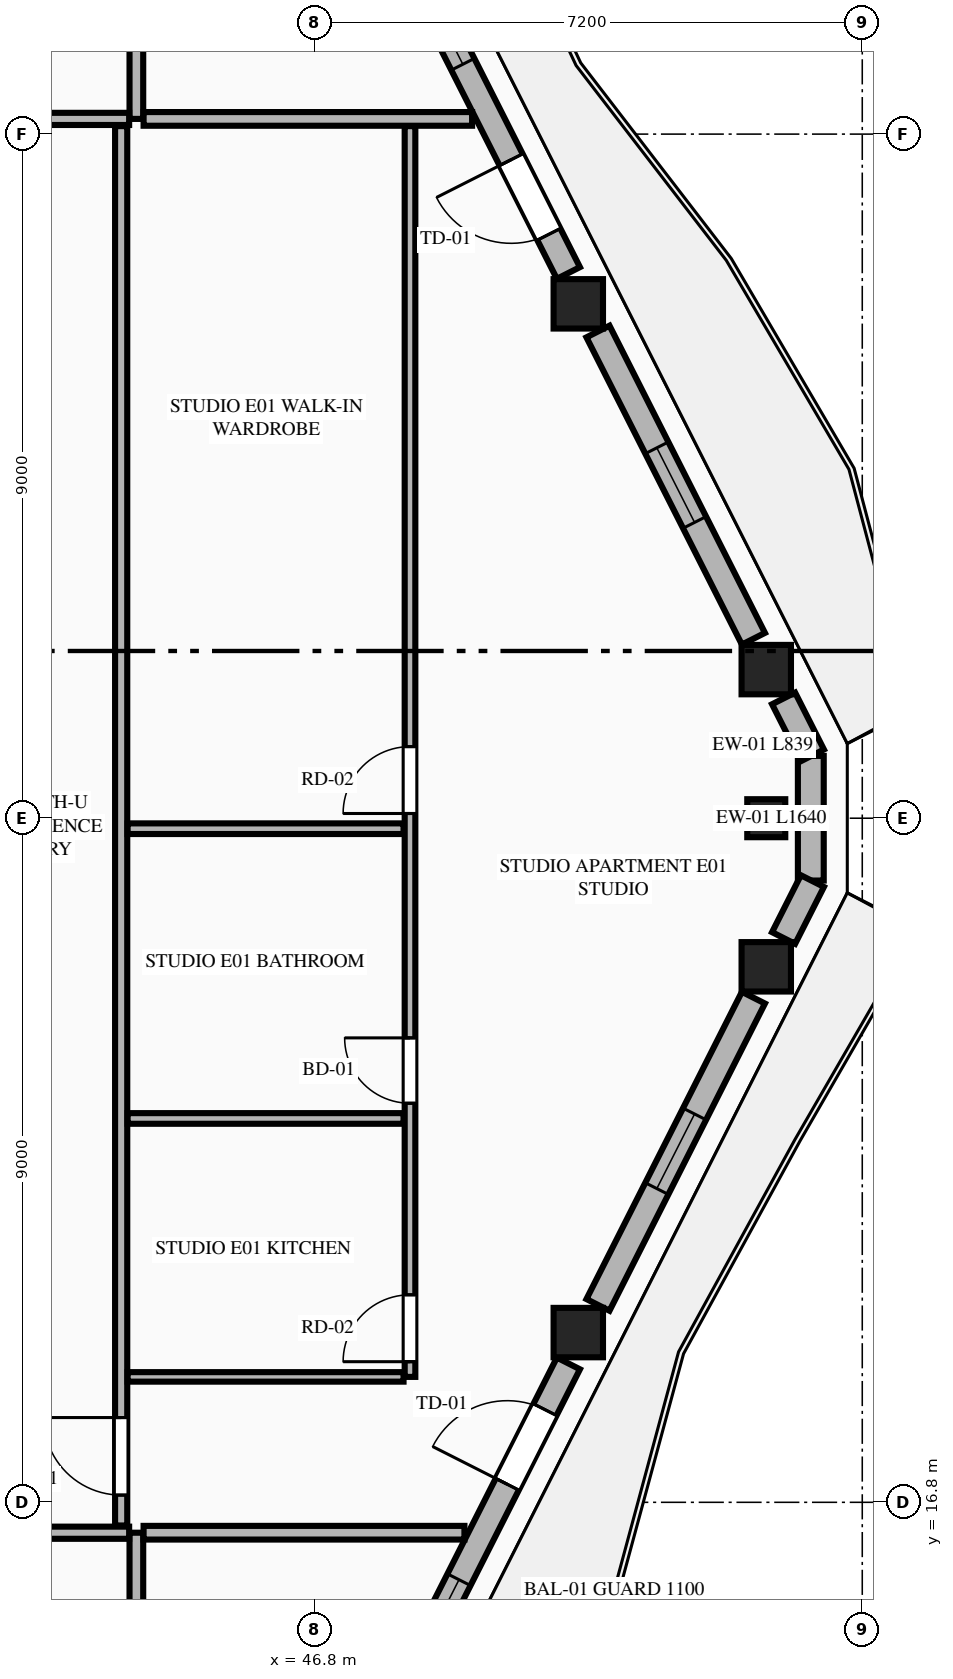
"""IFC4 building model, lengths in metres.
Left out: names, types, materials, properties, quantities, classifications, styles, units other than length and angle.
Written with IfcOpenShell. Run it as: python <this file> out.ifc"""

import sys

from ifc_helpers import new_model, si_unit, direction, frame, frame_2d, origin, origin_2d, place, context, subcontext, project, spatial, rectangle, extrude, element, fill, save


model = new_model("IFC4")
c1 = context("Model", 3, precision=1e-05, world=origin(), true_north=direction((0.0, 1.0)))
c2 = subcontext(c1, "Body", "Model", "MODEL_VIEW")
j1 = project(units=[si_unit("LENGTHUNIT", "METRE"), si_unit("PLANEANGLEUNIT", "RADIAN")], contexts=[c1])
p1 = place(None, origin())
s1 = spatial("IfcSite", under=j1, at=p1, CompositionType="ELEMENT")
p2 = place(p1, origin())
s2 = spatial("IfcBuilding", under=s1, at=p2, CompositionType="ELEMENT")
p3 = place(p2, frame((0.0, 0.0, 283.5)))
s3 = spatial("IfcBuildingStorey", under=s2, at=p3, CompositionType="ELEMENT", Elevation=283.5)
for number, where, z_axis, x_axis in (
    (1, (50.264, 19.033, 0.0), (0.0, 0.0, 1.0), (1.0, 0.0, 0.0)),
    (2, (52.737, 23.845, 0.0), (0.0, 0.0, 1.0), (1.0, 0.0, 0.0)),
    (3, (52.737, 27.755, 0.0), (0.0, 0.0, 1.0), (1.0, 0.0, 0.0)),
    (4, (50.264, 32.567, 0.0), (0.0, 0.0, 1.0), (1.0, 0.0, 0.0)),
):
    element("IfcColumn", number, at=place(p3, frame(where, z_axis=z_axis, x_axis=x_axis)), inside=s3, PredefinedType="COLUMN", context=c2, shape_type="SweptSolid", body=[
        extrude(rectangle(XDim=0.65, YDim=0.65, at=origin_2d()), origin(), (0.0, 0.0, 1.0), 4.0),
    ])
p4 = place(p3, frame((52.737, 25.8, 0.0), z_axis=(0.0, 0.0, 1.0), x_axis=(0.0, 1.0, 0.0)))
e5 = element("IfcColumn", 5, at=p4, inside=s3, PredefinedType="PILASTER", context=c2, shape_type="SweptSolid", body=[
    extrude(rectangle(XDim=0.5, YDim=0.35, at=origin_2d()), origin(), (0.0, 0.0, 1.0), 4.0),
])
p5 = place(p3, frame((53.323, 24.98, 0.0), z_axis=(0.0, 0.0, 1.0), x_axis=(0.0, 1.0, 0.0)))
e6 = element("IfcWall", 6, at=p5, inside=s3, PredefinedType="STANDARD", context=c2, shape_type="SweptSolid", body=[
    extrude(rectangle(XDim=1.64, YDim=0.34, at=frame_2d((0.82, 0.0))), origin(), (0.0, 0.0, 1.0), 3.8),
])
p6 = place(p3, frame((48.002, 14.413, 0.0), z_axis=(0.0, 0.0, 1.0), x_axis=(0.451468341582, 0.892287137949, 0.0)))
e7 = element("IfcWall", 7, at=p6, inside=s3, PredefinedType="STANDARD", context=c2, shape_type="SweptSolid", body=[
    extrude(rectangle(XDim=4.723, YDim=0.34, at=frame_2d((2.361, 0.0))), origin(), (0.0, 0.0, 1.0), 2.99),
])
p7 = place(p6, frame((2.941, 0.0, 0.0)))
e8 = element("IfcOpeningElement", 8, at=p7, cuts=e7, PredefinedType="OPENING", context=c2, shape_type="SweptSolid", body=[
    extrude(rectangle(XDim=1.1, YDim=2.25, at=frame_2d((0.55, 1.125))), frame((0.0, 0.18, 0.0), z_axis=(0.0, -1.0, 0.0), x_axis=(1.0, 0.0, 0.0)), (0.0, 0.0, 1.0), 0.36),
])
p8 = place(p6, frame((0.434, 0.0, 0.75)))
e9 = element("IfcOpeningElement", 9, at=p8, cuts=e7, PredefinedType="OPENING", context=c2, shape_type="SweptSolid", body=[
    extrude(rectangle(XDim=1.1, YDim=2.0, at=frame_2d((0.55, 1.0))), frame((0.0, 0.18, 0.0), z_axis=(0.0, -1.0, 0.0), x_axis=(1.0, 0.0, 0.0)), (0.0, 0.0, 1.0), 0.36),
])
p9 = place(p3, frame((50.523, 19.397, 0.0), z_axis=(0.0, 0.0, 1.0), x_axis=(0.45147697324, 0.892282770558, 0.0)))
e10 = element("IfcWall", 10, at=p9, inside=s3, PredefinedType="STANDARD", context=c2, shape_type="SweptSolid", body=[
    extrude(rectangle(XDim=4.53, YDim=0.34, at=frame_2d((2.265, 0.0))), origin(), (0.0, 0.0, 1.0), 2.99),
])
p10 = place(p9, frame((1.715, 0.0, 0.75)))
e11 = element("IfcOpeningElement", 11, at=p10, cuts=e10, PredefinedType="OPENING", context=c2, shape_type="SweptSolid", body=[
    extrude(rectangle(XDim=1.1, YDim=2.0, at=frame_2d((0.55, 1.0))), frame((0.0, 0.18, 0.0), z_axis=(0.0, -1.0, 0.0), x_axis=(1.0, 0.0, 0.0)), (0.0, 0.0, 1.0), 0.36),
])
p11 = place(p3, frame((52.965, 24.224, 0.0), z_axis=(0.0, 0.0, 1.0), x_axis=(0.4515140893, 0.892263989615, 0.0)))
e12 = element("IfcWall", 12, at=p11, inside=s3, PredefinedType="STANDARD", context=c2, shape_type="SweptSolid", body=[
    extrude(rectangle(XDim=0.839, YDim=0.34, at=frame_2d((0.419, 0.0))), origin(), (0.0, 0.0, 1.0), 3.8),
])
p12 = place(p3, frame((53.344, 26.627, 0.0), z_axis=(0.0, 0.0, 1.0), x_axis=(-0.45139691133, 0.892323275748, 0.0)))
e13 = element("IfcWall", 13, at=p12, inside=s3, PredefinedType="STANDARD", context=c2, shape_type="SweptSolid", body=[
    extrude(rectangle(XDim=0.839, YDim=0.34, at=frame_2d((0.42, 0.0))), origin(), (0.0, 0.0, 1.0), 3.8),
])
p13 = place(p3, frame((52.568, 28.161, 0.0), z_axis=(0.0, 0.0, 1.0), x_axis=(-0.45147697324, 0.892282770558, 0.0)))
e14 = element("IfcWall", 14, at=p13, inside=s3, PredefinedType="STANDARD", context=c2, shape_type="SweptSolid", body=[
    extrude(rectangle(XDim=4.53, YDim=0.34, at=frame_2d((2.265, 0.0))), origin(), (0.0, 0.0, 1.0), 2.99),
])
p14 = place(p13, frame((1.715, 0.0, 0.75)))
e15 = element("IfcOpeningElement", 15, at=p14, cuts=e14, PredefinedType="OPENING", context=c2, shape_type="SweptSolid", body=[
    extrude(rectangle(XDim=1.1, YDim=2.0, at=frame_2d((0.55, 1.0))), frame((0.0, 0.18, 0.0), z_axis=(0.0, -1.0, 0.0), x_axis=(1.0, 0.0, 0.0)), (0.0, 0.0, 1.0), 0.36),
])
p15 = place(p3, frame((50.134, 32.973, 0.0), z_axis=(0.0, 0.0, 1.0), x_axis=(-0.451447516904, 0.892297674255, 0.0)))
e16 = element("IfcWall", 16, at=p15, inside=s3, PredefinedType="STANDARD", context=c2, shape_type="SweptSolid", body=[
    extrude(rectangle(XDim=4.723, YDim=0.34, at=frame_2d((2.361, 0.0))), origin(), (0.0, 0.0, 1.0), 2.99),
])
p16 = place(p15, frame((0.57, 0.0, 0.0)))
e17 = element("IfcOpeningElement", 17, at=p16, cuts=e16, PredefinedType="OPENING", context=c2, shape_type="SweptSolid", body=[
    extrude(rectangle(XDim=1.1, YDim=2.25, at=frame_2d((0.55, 1.125))), frame((0.0, 0.18, 0.0), z_axis=(0.0, -1.0, 0.0), x_axis=(1.0, 0.0, 0.0)), (0.0, 0.0, 1.0), 0.36),
])
p17 = place(p15, frame((3.077, 0.0, 0.75)))
e18 = element("IfcOpeningElement", 18, at=p17, cuts=e16, PredefinedType="OPENING", context=c2, shape_type="SweptSolid", body=[
    extrude(rectangle(XDim=1.1, YDim=2.0, at=frame_2d((0.55, 1.0))), frame((0.0, 0.18, 0.0), z_axis=(0.0, -1.0, 0.0), x_axis=(1.0, 0.0, 0.0)), (0.0, 0.0, 1.0), 0.36),
])
p18 = place(p3, frame((44.45, 8.119, 0.0), z_axis=(0.0, 0.0, 1.0), x_axis=(0.0, 1.0, 0.0)))
e19 = element("IfcWall", 19, at=p18, inside=s3, PredefinedType="PARTITIONING", context=c2, shape_type="SweptSolid", body=[
    extrude(rectangle(XDim=8.281, YDim=0.18, at=frame_2d((4.141, 0.0))), origin(), (0.0, 0.0, 1.0), 3.8),
])
p19 = place(p3, frame((29.241, 16.4, 0.0), z_axis=(0.0, 0.0, 1.0), x_axis=(1.0, 0.0, 0.0)))
e20 = element("IfcWall", 20, at=p19, inside=s3, PredefinedType="PARTITIONING", context=c2, shape_type="SweptSolid", body=[
    extrude(rectangle(XDim=15.114, YDim=0.16, at=frame_2d((7.557, 0.0))), origin(), (0.0, 0.0, 1.0), 3.8),
])
p20 = place(p19, frame((12.909, 0.0, 0.0)))
e21 = element("IfcOpeningElement", 21, at=p20, cuts=e20, PredefinedType="OPENING", context=c2, shape_type="SweptSolid", body=[
    extrude(rectangle(XDim=1.02, YDim=2.25, at=frame_2d((0.51, 1.125))), frame((0.0, 0.09, 0.0), z_axis=(0.0, -1.0, 0.0), x_axis=(1.0, 0.0, 0.0)), (0.0, 0.0, 1.0), 0.18),
])
p21 = place(p3, frame((44.45, 35.0, 0.0), z_axis=(0.0, 0.0, 1.0), x_axis=(0.0, 1.0, 0.0)))
e22 = element("IfcWall", 22, at=p21, inside=s3, PredefinedType="PARTITIONING", context=c2, shape_type="SweptSolid", body=[
    extrude(rectangle(XDim=8.481, YDim=0.18, at=frame_2d((4.24, 0.0))), origin(), (0.0, 0.0, 1.0), 3.8),
])
p22 = place(p3, frame((20.445, 35.0, 0.0), z_axis=(0.0, 0.0, 1.0), x_axis=(1.0, 0.0, 0.0)))
e23 = element("IfcWall", 23, at=p22, inside=s3, PredefinedType="PARTITIONING", context=c2, shape_type="SweptSolid", body=[
    extrude(rectangle(XDim=23.91, YDim=0.16, at=frame_2d((11.955, 0.0))), origin(), (0.0, 0.0, 1.0), 3.8),
])
p23 = place(p22, frame((0.405, 0.0, 0.0)))
e24 = element("IfcOpeningElement", 24, at=p23, cuts=e23, PredefinedType="OPENING", context=c2, shape_type="SweptSolid", body=[
    extrude(rectangle(XDim=1.35, YDim=2.35, at=frame_2d((0.675, 1.175))), frame((0.0, 0.09, 0.0), z_axis=(0.0, -1.0, 0.0), x_axis=(1.0, 0.0, 0.0)), (0.0, 0.0, 1.0), 0.18),
])
p24 = place(p3, frame((44.545, 16.4, 0.0), z_axis=(0.0, 0.0, 1.0), x_axis=(1.0, 0.0, 0.0)))
e25 = element("IfcWall", 25, at=p24, inside=s3, PredefinedType="PARTITIONING", context=c2, shape_type="SweptSolid", body=[
    extrude(rectangle(XDim=4.221, YDim=0.18, at=frame_2d((2.111, 0.0))), origin(), (0.0, 0.0, 1.0), 3.8),
])
p25 = place(p3, frame((44.545, 35.0, 0.0), z_axis=(0.0, 0.0, 1.0), x_axis=(1.0, 0.0, 0.0)))
e26 = element("IfcWall", 26, at=p25, inside=s3, PredefinedType="PARTITIONING", context=c2, shape_type="SweptSolid", body=[
    extrude(rectangle(XDim=4.322, YDim=0.18, at=frame_2d((2.161, 0.0))), origin(), (0.0, 0.0, 1.0), 3.8),
])
p26 = place(p3, frame((44.25, 16.495, 0.0), z_axis=(0.0, 0.0, 1.0), x_axis=(0.0, 1.0, 0.0)))
e27 = element("IfcWall", 27, at=p26, inside=s3, PredefinedType="PARTITIONING", context=c2, shape_type="SweptSolid", body=[
    extrude(rectangle(XDim=18.41, YDim=0.16, at=frame_2d((9.205, 0.0))), origin(), (0.0, 0.0, 1.0), 3.487),
])
p27 = place(p26, frame((0.4, 0.0, 0.0)))
e28 = element("IfcOpeningElement", 28, at=p27, cuts=e27, PredefinedType="OPENING", context=c2, shape_type="SweptSolid", body=[
    extrude(rectangle(XDim=1.02, YDim=2.25, at=frame_2d((0.51, 1.125))), frame((0.0, 0.09, 0.0), z_axis=(0.0, -1.0, 0.0), x_axis=(1.0, 0.0, 0.0)), (0.0, 0.0, 1.0), 0.18),
])
p28 = place(p3, frame((44.335, 18.45, 0.0), z_axis=(0.0, 0.0, 1.0), x_axis=(1.0, 0.0, 0.0)))
e29 = element("IfcWall", 29, at=p28, inside=s3, PredefinedType="PARTITIONING", context=c2, shape_type="SweptSolid", body=[
    extrude(rectangle(XDim=3.63, YDim=0.125, at=frame_2d((1.815, 0.0))), origin(), (0.0, 0.0, 1.0), 3.8),
])
p29 = place(p3, frame((48.05, 18.45, 0.0), z_axis=(0.0, 0.0, 1.0), x_axis=(0.0, 1.0, 0.0)))
e30 = element("IfcWall", 30, at=p29, inside=s3, PredefinedType="PLUMBINGWALL", context=c2, shape_type="SweptSolid", body=[
    extrude(rectangle(XDim=16.455, YDim=0.14, at=frame_2d((8.228, 0.0))), origin(), (0.0, 0.0, 1.0), 3.8),
])
p30 = place(p29, frame((3.6, 0.0, 0.0)))
e31 = element("IfcOpeningElement", 31, at=p30, cuts=e30, PredefinedType="OPENING", context=c2, shape_type="SweptSolid", body=[
    extrude(rectangle(XDim=0.86, YDim=2.1, at=frame_2d((0.43, 1.05))), frame((0.0, 0.08, 0.0), z_axis=(0.0, -1.0, 0.0), x_axis=(1.0, 0.0, 0.0)), (0.0, 0.0, 1.0), 0.16),
])
p31 = place(p29, frame((7.412, 0.0, 0.0)))
e32 = element("IfcOpeningElement", 32, at=p31, cuts=e30, PredefinedType="OPENING", context=c2, shape_type="SweptSolid", body=[
    extrude(rectangle(XDim=0.88, YDim=2.15, at=frame_2d((0.44, 1.075))), frame((0.0, 0.08, 0.0), z_axis=(0.0, -1.0, 0.0), x_axis=(1.0, 0.0, 0.0)), (0.0, 0.0, 1.0), 0.16),
])
p32 = place(p29, frame((0.2, 0.0, 0.0)))
e33 = element("IfcOpeningElement", 33, at=p32, cuts=e30, PredefinedType="OPENING", context=c2, shape_type="SweptSolid", body=[
    extrude(rectangle(XDim=0.88, YDim=2.15, at=frame_2d((0.44, 1.075))), frame((0.0, 0.08, 0.0), z_axis=(0.0, -1.0, 0.0), x_axis=(1.0, 0.0, 0.0)), (0.0, 0.0, 1.0), 0.16),
])
for number, where, z_axis, x_axis in (
    (34, (44.335, 21.85, 0.0), (0.0, 0.0, 1.0), (1.0, 0.0, 0.0)),
    (35, (44.335, 25.662, 0.0), (0.0, 0.0, 1.0), (1.0, 0.0, 0.0)),
):
    element("IfcWall", number, at=place(p3, frame(where, z_axis=z_axis, x_axis=x_axis)), inside=s3, PredefinedType="PLUMBINGWALL", context=c2, shape_type="SweptSolid", body=[
        extrude(rectangle(XDim=3.63, YDim=0.14, at=frame_2d((1.815, 0.0))), origin(), (0.0, 0.0, 1.0), 3.8),
    ])
p33 = place(p7, origin())
e36 = element("IfcDoor", 36, at=p33, inside=s3, OperationType="SINGLE_SWING_LEFT", PredefinedType="DOOR", context=c2, shape_type="SweptSolid", body=[
    extrude(rectangle(XDim=1.1, YDim=2.25, at=frame_2d((0.55, 1.125))), frame((0.0, 0.025, 0.0), z_axis=(0.0, -1.0, 0.0), x_axis=(1.0, 0.0, 0.0)), (0.0, 0.0, 1.0), 0.05),
])
fill(e8, e36)
p34 = place(p10, origin())
e37 = element("IfcWindow", 37, at=p34, inside=s3, PartitioningType="SINGLE_PANEL", PredefinedType="WINDOW", context=c2, shape_type="SweptSolid", body=[
    extrude(rectangle(XDim=1.1, YDim=2.0, at=frame_2d((0.55, 1.0))), frame((0.0, 0.03, 0.0), z_axis=(0.0, -1.0, 0.0), x_axis=(1.0, 0.0, 0.0)), (0.0, 0.0, 1.0), 0.06),
])
fill(e11, e37)
p35 = place(p14, origin())
e38 = element("IfcWindow", 38, at=p35, inside=s3, PartitioningType="SINGLE_PANEL", PredefinedType="WINDOW", context=c2, shape_type="SweptSolid", body=[
    extrude(rectangle(XDim=1.1, YDim=2.0, at=frame_2d((0.55, 1.0))), frame((0.0, 0.03, 0.0), z_axis=(0.0, -1.0, 0.0), x_axis=(1.0, 0.0, 0.0)), (0.0, 0.0, 1.0), 0.06),
])
fill(e15, e38)
p36 = place(p16, origin())
e39 = element("IfcDoor", 39, at=p36, inside=s3, OperationType="SINGLE_SWING_RIGHT", PredefinedType="DOOR", context=c2, shape_type="SweptSolid", body=[
    extrude(rectangle(XDim=1.1, YDim=2.25, at=frame_2d((0.55, 1.125))), frame((0.0, 0.025, 0.0), z_axis=(0.0, -1.0, 0.0), x_axis=(1.0, 0.0, 0.0)), (0.0, 0.0, 1.0), 0.05),
])
fill(e17, e39)
p37 = place(p30, origin())
e40 = element("IfcDoor", 40, at=p37, inside=s3, OperationType="SINGLE_SWING_RIGHT", PredefinedType="DOOR", context=c2, shape_type="SweptSolid", body=[
    extrude(rectangle(XDim=0.86, YDim=2.1, at=frame_2d((0.43, 1.05))), frame((0.0, 0.025, 0.0), z_axis=(0.0, -1.0, 0.0), x_axis=(1.0, 0.0, 0.0)), (0.0, 0.0, 1.0), 0.05),
])
fill(e31, e40)
p38 = place(p31, origin())
e41 = element("IfcDoor", 41, at=p38, inside=s3, OperationType="SINGLE_SWING_LEFT", PredefinedType="DOOR", context=c2, shape_type="SweptSolid", body=[
    extrude(rectangle(XDim=0.88, YDim=2.15, at=frame_2d((0.44, 1.075))), frame((0.0, 0.025, 0.0), z_axis=(0.0, -1.0, 0.0), x_axis=(1.0, 0.0, 0.0)), (0.0, 0.0, 1.0), 0.05),
])
fill(e32, e41)
p39 = place(p27, origin())
e42 = element("IfcDoor", 42, at=p39, inside=s3, OperationType="SINGLE_SWING_RIGHT", PredefinedType="DOOR", context=c2, shape_type="SweptSolid", body=[
    extrude(rectangle(XDim=1.02, YDim=2.25, at=frame_2d((0.51, 1.125))), frame((0.0, 0.025, 0.0), z_axis=(0.0, -1.0, 0.0), x_axis=(1.0, 0.0, 0.0)), (0.0, 0.0, 1.0), 0.05),
])
fill(e28, e42)
p40 = place(p32, origin())
e43 = element("IfcDoor", 43, at=p40, inside=s3, OperationType="SINGLE_SWING_LEFT", PredefinedType="DOOR", context=c2, shape_type="SweptSolid", body=[
    extrude(rectangle(XDim=0.88, YDim=2.15, at=frame_2d((0.44, 1.075))), frame((0.0, 0.025, 0.0), z_axis=(0.0, -1.0, 0.0), x_axis=(1.0, 0.0, 0.0)), (0.0, 0.0, 1.0), 0.05),
])
fill(e33, e43)
p41 = place(p8, origin())
e44 = element("IfcWindow", 44, at=p41, inside=s3, PartitioningType="SINGLE_PANEL", PredefinedType="WINDOW", context=c2, shape_type="SweptSolid", body=[
    extrude(rectangle(XDim=1.1, YDim=2.0, at=frame_2d((0.55, 1.0))), frame((0.0, 0.03, 0.0), z_axis=(0.0, -1.0, 0.0), x_axis=(1.0, 0.0, 0.0)), (0.0, 0.0, 1.0), 0.06),
])
fill(e9, e44)
p42 = place(p17, origin())
e45 = element("IfcWindow", 45, at=p42, inside=s3, PartitioningType="SINGLE_PANEL", PredefinedType="WINDOW", context=c2, shape_type="SweptSolid", body=[
    extrude(rectangle(XDim=1.1, YDim=2.0, at=frame_2d((0.55, 1.0))), frame((0.0, 0.03, 0.0), z_axis=(0.0, -1.0, 0.0), x_axis=(1.0, 0.0, 0.0)), (0.0, 0.0, 1.0), 0.06),
])
fill(e18, e45)
save(model, sys.argv[1])
